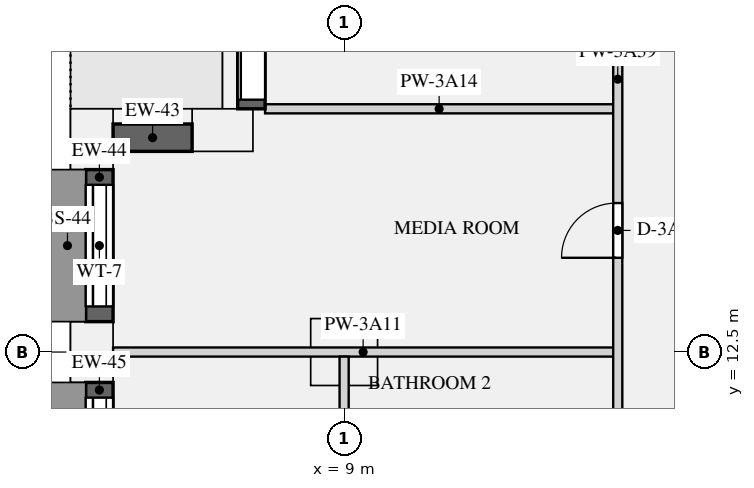
"""IFC4 building model, lengths in metres.
Left out: names, types, materials, properties, quantities, classifications, styles, units other than length and angle.
Written with IfcOpenShell. Run it as: python <this file> out.ifc"""

import sys

from ifc_helpers import new_model, si_unit, direction, frame, frame_2d, origin, origin_2d, place, context, subcontext, project, spatial, rectangle, extrude, element, fill, save


model = new_model("IFC4")
c1 = context("Model", 3, precision=1e-05, world=origin(), true_north=direction((0.0, 1.0)))
c2 = subcontext(c1, "Body", "Model", "MODEL_VIEW")
j1 = project(units=[si_unit("LENGTHUNIT", "METRE"), si_unit("PLANEANGLEUNIT", "RADIAN")], contexts=[c1])
p1 = place(None, origin())
s1 = spatial("IfcSite", under=j1, at=p1, CompositionType="ELEMENT")
p2 = place(p1, origin())
s2 = spatial("IfcBuilding", under=s1, at=p2, CompositionType="ELEMENT")
p3 = place(p2, frame((0.0, 0.0, 144.45)))
s3 = spatial("IfcBuildingStorey", under=s2, at=p3, CompositionType="ELEMENT", Elevation=144.45)
for number, where, z_axis, x_axis in (
    (1, (7.0, 16.15, 0.0), (0.0, 0.0, 1.0), (-1.0, 0.0, 0.0)),
    (2, (4.85, 16.0, 0.0), (0.0, 0.0, 1.0), (0.0, -1.0, 0.0)),
    (3, (4.85, 12.5, 0.0), (0.0, 0.0, 1.0), (0.0, -1.0, 0.0)),
):
    element("IfcColumn", number, at=place(p3, frame(where, z_axis=z_axis, x_axis=x_axis)), inside=s3, PredefinedType="USERDEFINED", context=c2, shape_type="SweptSolid", body=[
        extrude(rectangle(XDim=1.0, YDim=0.7, at=origin_2d()), origin(), (0.0, 0.0, 1.0), 3.15),
    ])
p4 = place(p3, frame((9.0, 12.5, 0.0), z_axis=(0.0, 0.0, 1.0), x_axis=(1.0, 0.0, 0.0)))
e4 = element("IfcColumn", 4, at=p4, inside=s3, PredefinedType="COLUMN", context=c2, shape_type="SweptSolid", body=[
    extrude(rectangle(XDim=1.1, YDim=1.1, at=origin_2d()), origin(), (0.0, 0.0, 1.0), 3.15),
])
p5 = place(p3, frame((7.475, 20.0, 0.0), z_axis=(0.0, 0.0, 1.0), x_axis=(0.0, -1.0, 0.0)))
e5 = element("IfcWall", 5, at=p5, inside=s3, PredefinedType="SOLIDWALL", context=c2, shape_type="SweptSolid", body=[
    extrude(rectangle(XDim=3.5, YDim=0.45, at=frame_2d((1.75, 0.0))), origin(), (0.0, 0.0, 1.0), 2.83),
])
p6 = place(p5, frame((0.15, 0.0, 0.0)))
e6 = element("IfcOpeningElement", 6, at=p6, cuts=e5, PredefinedType="OPENING", context=c2, shape_type="SweptSolid", body=[
    extrude(rectangle(XDim=3.2, YDim=2.3, at=frame_2d((1.6, 1.15))), frame((0.0, 0.235, 0.0), z_axis=(0.0, -1.0, 0.0), x_axis=(1.0, 0.0, 0.0)), (0.0, 0.0, 1.0), 0.47),
])
p7 = place(p3, frame((6.5, 16.025, 0.9), z_axis=(0.0, 0.0, 1.0), x_axis=(-1.0, 0.0, 0.0)))
e7 = element("IfcWall", 7, at=p7, inside=s3, PredefinedType="SOLIDWALL", context=c2, shape_type="SweptSolid", body=[
    extrude(rectangle(XDim=1.3, YDim=0.45, at=frame_2d((0.65, 0.0))), origin(), (0.0, 0.0, 1.0), 1.93),
])
p8 = place(p3, frame((4.975, 15.5, 0.9), z_axis=(0.0, 0.0, 1.0), x_axis=(0.0, -1.0, 0.0)))
e8 = element("IfcWall", 8, at=p8, inside=s3, PredefinedType="SOLIDWALL", context=c2, shape_type="SweptSolid", body=[
    extrude(rectangle(XDim=2.5, YDim=0.45, at=frame_2d((1.25, 0.0))), origin(), (0.0, 0.0, 1.0), 1.93),
])
p9 = place(p8, frame((0.25, 0.0, 0.15)))
e9 = element("IfcOpeningElement", 9, at=p9, cuts=e8, PredefinedType="OPENING", context=c2, shape_type="SweptSolid", body=[
    extrude(rectangle(XDim=2.0, YDim=1.5, at=frame_2d((1.0, 0.75))), frame((0.0, 0.235, 0.0), z_axis=(0.0, -1.0, 0.0), x_axis=(1.0, 0.0, 0.0)), (0.0, 0.0, 1.0), 0.47),
])
p10 = place(p3, frame((4.975, 12.0, 0.9), z_axis=(0.0, 0.0, 1.0), x_axis=(0.0, -1.0, 0.0)))
e10 = element("IfcWall", 10, at=p10, inside=s3, PredefinedType="SOLIDWALL", context=c2, shape_type="SweptSolid", body=[
    extrude(rectangle(XDim=3.0, YDim=0.45, at=frame_2d((1.5, 0.0))), origin(), (0.0, 0.0, 1.0), 1.93),
])
p11 = place(p10, frame((0.25, 0.0, 0.15)))
e11 = element("IfcOpeningElement", 11, at=p11, cuts=e10, PredefinedType="OPENING", context=c2, shape_type="SweptSolid", body=[
    extrude(rectangle(XDim=2.5, YDim=1.5, at=frame_2d((1.25, 0.75))), frame((0.0, 0.235, 0.0), z_axis=(0.0, -1.0, 0.0), x_axis=(1.0, 0.0, 0.0)), (0.0, 0.0, 1.0), 0.47),
])
p12 = place(p3, frame((5.2, 12.5, 0.0), z_axis=(0.0, 0.0, 1.0), x_axis=(1.0, 0.0, 0.0)))
e12 = element("IfcWall", 12, at=p12, inside=s3, PredefinedType="PARTITIONING", context=c2, shape_type="SweptSolid", body=[
    extrude(rectangle(XDim=8.225, YDim=0.15, at=frame_2d((4.113, 0.0))), origin(), (0.0, 0.0, 1.0), 2.83),
])
p13 = place(p3, frame((7.7, 16.5, 0.0), z_axis=(0.0, 0.0, 1.0), x_axis=(1.0, 0.0, 0.0)))
e13 = element("IfcWall", 13, at=p13, inside=s3, PredefinedType="PARTITIONING", context=c2, shape_type="SweptSolid", body=[
    extrude(rectangle(XDim=5.725, YDim=0.15, at=frame_2d((2.863, 0.0))), origin(), (0.0, 0.0, 1.0), 2.83),
])
p14 = place(p3, frame((13.5, 10.575, 0.0), z_axis=(0.0, 0.0, 1.0), x_axis=(0.0, 1.0, 0.0)))
e14 = element("IfcWall", 14, at=p14, inside=s3, PredefinedType="PARTITIONING", context=c2, shape_type="SweptSolid", body=[
    extrude(rectangle(XDim=12.325, YDim=0.15, at=frame_2d((6.163, 0.0))), origin(), (0.0, 0.0, 1.0), 2.83),
])
p15 = place(p14, frame((3.475, 0.0, 0.0)))
e15 = element("IfcOpeningElement", 15, at=p15, cuts=e14, PredefinedType="OPENING", context=c2, shape_type="SweptSolid", body=[
    extrude(rectangle(XDim=0.9, YDim=2.1, at=frame_2d((0.45, 1.05))), frame((0.0, 0.085, 0.0), z_axis=(0.0, -1.0, 0.0), x_axis=(1.0, 0.0, 0.0)), (0.0, 0.0, 1.0), 0.17),
])
p16 = place(p14, frame((8.45, 0.0, 0.0)))
e16 = element("IfcOpeningElement", 16, at=p16, cuts=e14, PredefinedType="OPENING", context=c2, shape_type="SweptSolid", body=[
    extrude(rectangle(XDim=1.5, YDim=2.1, at=frame_2d((0.75, 1.05))), frame((0.0, 0.085, 0.0), z_axis=(0.0, -1.0, 0.0), x_axis=(1.0, 0.0, 0.0)), (0.0, 0.0, 1.0), 0.17),
])
p17 = place(p3, frame((9.0, 8.575, 0.0), z_axis=(0.0, 0.0, 1.0), x_axis=(0.0, 1.0, 0.0)))
e17 = element("IfcWall", 17, at=p17, inside=s3, PredefinedType="PARTITIONING", context=c2, shape_type="SweptSolid", body=[
    extrude(rectangle(XDim=3.85, YDim=0.15, at=frame_2d((1.925, 0.0))), origin(), (0.0, 0.0, 1.0), 2.83),
])
p18 = place(p6, origin())
e18 = element("IfcDoor", 18, at=p18, inside=s3, OperationType="SLIDING_TO_LEFT", PredefinedType="DOOR", context=c2, shape_type="SweptSolid", body=[
    extrude(rectangle(XDim=3.2, YDim=2.3, at=frame_2d((1.6, 1.15))), frame((0.0, -0.07, 0.0), z_axis=(0.0, -1.0, 0.0), x_axis=(1.0, 0.0, 0.0)), (0.0, 0.0, 1.0), 0.05),
])
fill(e6, e18)
p19 = place(p9, origin())
e19 = element("IfcWindow", 19, at=p19, inside=s3, PartitioningType="SINGLE_PANEL", PredefinedType="WINDOW", context=c2, shape_type="SweptSolid", body=[
    extrude(rectangle(XDim=2.0, YDim=1.5, at=frame_2d((1.0, 0.75))), frame((0.0, -0.065, 0.0), z_axis=(0.0, -1.0, 0.0), x_axis=(1.0, 0.0, 0.0)), (0.0, 0.0, 1.0), 0.06),
])
fill(e9, e19)
p20 = place(p11, origin())
e20 = element("IfcWindow", 20, at=p20, inside=s3, PartitioningType="SINGLE_PANEL", PredefinedType="WINDOW", context=c2, shape_type="SweptSolid", body=[
    extrude(rectangle(XDim=2.5, YDim=1.5, at=frame_2d((1.25, 0.75))), frame((0.0, -0.065, 0.0), z_axis=(0.0, -1.0, 0.0), x_axis=(1.0, 0.0, 0.0)), (0.0, 0.0, 1.0), 0.06),
])
fill(e11, e20)
p21 = place(p15, origin())
e21 = element("IfcDoor", 21, at=p21, inside=s3, OperationType="SINGLE_SWING_LEFT", PredefinedType="DOOR", context=c2, shape_type="SweptSolid", body=[
    extrude(rectangle(XDim=0.9, YDim=2.1, at=frame_2d((0.45, 1.05))), frame((0.0, 0.025, 0.0), z_axis=(0.0, -1.0, 0.0), x_axis=(1.0, 0.0, 0.0)), (0.0, 0.0, 1.0), 0.05),
])
fill(e15, e21)
save(model, sys.argv[1])
